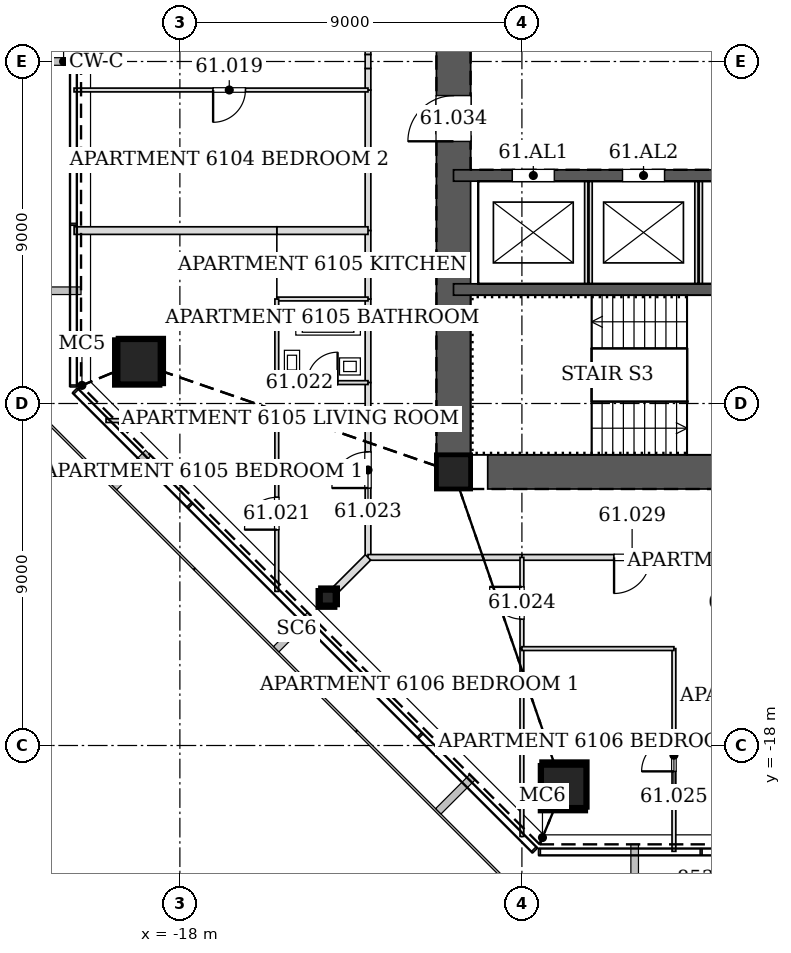
"""IFC4 building model, lengths in metres.
Left out: names, types, materials, properties, quantities, classifications, styles, units other than length and angle.
Written with IfcOpenShell. Run it as: python <this file> out.ifc"""

import sys

from ifc_helpers import new_model, si_unit, direction, frame, frame_2d, origin, origin_2d, place, context, subcontext, project, spatial, rectangle, hollow_rectangle, extrude, element, fill, save


model = new_model("IFC4")
c1 = context("Model", 3, precision=1e-05, world=origin(), true_north=direction((0.0, 1.0)))
c2 = subcontext(c1, "Body", "Model", "MODEL_VIEW")
j1 = project(units=[si_unit("LENGTHUNIT", "METRE"), si_unit("PLANEANGLEUNIT", "RADIAN")], contexts=[c1])
p1 = place(None, origin())
s1 = spatial("IfcSite", under=j1, at=p1, CompositionType="ELEMENT")
p2 = place(p1, origin())
s2 = spatial("IfcBuilding", under=s1, at=p2, CompositionType="ELEMENT")
p3 = place(p2, frame((0.0, 0.0, 255.0)))
s3 = spatial("IfcBuildingStorey", under=s2, at=p3, CompositionType="ELEMENT", Elevation=255.0)
for number, where, z_axis, x_axis in (
    (1, (-19.123, -7.921, 0.0), (0.028, 0.012, 1.0), (-0.383, 0.924, 0.0)),
    (2, (-7.921, -19.123, 0.0), (0.012, 0.028, 1.0), (-0.924, 0.383, 0.0)),
):
    element("IfcColumn", number, at=place(p3, frame(where, z_axis=z_axis, x_axis=x_axis)), inside=s3, PredefinedType="COLUMN", context=c2, shape_type="SweptSolid", body=[
        extrude(hollow_rectangle(XDim=1.2, YDim=1.2, WallThickness=0.055, at=origin_2d()), origin(), (0.0, 0.0, 1.0), 3.401),
    ])
for number, where, z_axis, x_axis in (
    (3, (-20.001, 0.0, 0.0), (0.028, 0.0, 1.0), (0.0, 1.0, 0.0)),
    (4, (-14.143, -14.143, 0.0), (0.02, 0.02, 1.0), (-0.707, 0.707, 0.0)),
):
    element("IfcColumn", number, at=place(p3, frame(where, z_axis=z_axis, x_axis=x_axis)), inside=s3, PredefinedType="COLUMN", context=c2, shape_type="SweptSolid", body=[
        extrude(hollow_rectangle(XDim=0.45, YDim=0.45, WallThickness=0.02, at=origin_2d()), origin(), (0.0, 0.0, 1.0), 3.401),
    ])
p4 = place(p3, frame((-10.8, -10.8, 0.0), z_axis=(0.0, 0.0, 1.0), x_axis=(1.0, 0.0, 0.0)))
e5 = element("IfcColumn", 5, at=p4, inside=s3, PredefinedType="COLUMN", context=c2, shape_type="SweptSolid", body=[
    extrude(hollow_rectangle(XDim=0.9, YDim=0.9, WallThickness=0.04, at=origin_2d()), origin(), (0.0, 0.0, 1.0), 3.4),
])
p5 = place(p3, frame((-10.8, -10.8, 0.0), z_axis=(0.0, 0.0, 1.0), x_axis=(1.0, 0.0, 0.0)))
e6 = element("IfcWall", 6, at=p5, inside=s3, PredefinedType="SOLIDWALL", context=c2, shape_type="SweptSolid", body=[
    extrude(rectangle(XDim=21.6, YDim=0.9, at=frame_2d((10.8, 0.0))), origin(), (0.0, 0.0, 1.0), 3.4),
])
p6 = place(p5, frame((10.05, 0.0, 0.0)))
e7 = element("IfcOpeningElement", 7, at=p6, cuts=e6, PredefinedType="OPENING", context=c2, shape_type="SweptSolid", body=[
    extrude(rectangle(XDim=1.5, YDim=2.1, at=frame_2d((0.75, 1.05))), frame((0.0, 0.46, 0.0), z_axis=(0.0, -1.0, 0.0), x_axis=(1.0, 0.0, 0.0)), (0.0, 0.0, 1.0), 0.92),
])
p7 = place(p5, frame((17.1, 0.0, 0.0)))
e8 = element("IfcOpeningElement", 8, at=p7, cuts=e6, PredefinedType="OPENING", context=c2, shape_type="SweptSolid", body=[
    extrude(rectangle(XDim=0.9, YDim=2.1, at=frame_2d((0.45, 1.05))), frame((0.0, 0.46, 0.0), z_axis=(0.0, -1.0, 0.0), x_axis=(1.0, 0.0, 0.0)), (0.0, 0.0, 1.0), 0.92),
])
p8 = place(p3, frame((-10.8, 10.8, 0.0), z_axis=(0.0, 0.0, 1.0), x_axis=(0.0, -1.0, 0.0)))
e9 = element("IfcWall", 9, at=p8, inside=s3, PredefinedType="SOLIDWALL", context=c2, shape_type="SweptSolid", body=[
    extrude(rectangle(XDim=21.6, YDim=0.9, at=frame_2d((10.8, 0.0))), origin(), (0.0, 0.0, 1.0), 3.4),
])
p9 = place(p8, frame((8.7, 0.0, 0.0)))
e10 = element("IfcOpeningElement", 10, at=p9, cuts=e9, PredefinedType="OPENING", context=c2, shape_type="SweptSolid", body=[
    extrude(rectangle(XDim=1.2, YDim=2.1, at=frame_2d((0.6, 1.05))), frame((0.0, 0.46, 0.0), z_axis=(0.0, -1.0, 0.0), x_axis=(1.0, 0.0, 0.0)), (0.0, 0.0, 1.0), 0.92),
])
p10 = place(p8, frame((11.7, 0.0, 0.0)))
e11 = element("IfcOpeningElement", 11, at=p10, cuts=e9, PredefinedType="OPENING", context=c2, shape_type="SweptSolid", body=[
    extrude(rectangle(XDim=1.2, YDim=2.1, at=frame_2d((0.6, 1.05))), frame((0.0, 0.46, 0.0), z_axis=(0.0, -1.0, 0.0), x_axis=(1.0, 0.0, 0.0)), (0.0, 0.0, 1.0), 0.92),
])
p11 = place(p3, frame((-10.8, -3.0, 0.0), z_axis=(0.0, 0.0, 1.0), x_axis=(1.0, 0.0, 0.0)))
e12 = element("IfcWall", 12, at=p11, inside=s3, PredefinedType="SOLIDWALL", context=c2, shape_type="SweptSolid", body=[
    extrude(rectangle(XDim=21.6, YDim=0.3, at=frame_2d((10.8, 0.0))), origin(), (0.0, 0.0, 1.0), 3.4),
])
p12 = place(p11, frame((13.25, 0.0, 0.0)))
e13 = element("IfcOpeningElement", 13, at=p12, cuts=e12, PredefinedType="OPENING", context=c2, shape_type="SweptSolid", body=[
    extrude(rectangle(XDim=0.9, YDim=2.1, at=frame_2d((0.45, 1.05))), frame((0.0, 0.16, 0.0), z_axis=(0.0, -1.0, 0.0), x_axis=(1.0, 0.0, 0.0)), (0.0, 0.0, 1.0), 0.32),
])
p13 = place(p11, frame((1.55, 0.0, 0.0)))
e14 = element("IfcOpeningElement", 14, at=p13, cuts=e12, PredefinedType="OPENING", context=c2, shape_type="SweptSolid", body=[
    extrude(rectangle(XDim=1.1, YDim=2.1, at=frame_2d((0.55, 1.05))), frame((0.0, 0.16, 0.0), z_axis=(0.0, -1.0, 0.0), x_axis=(1.0, 0.0, 0.0)), (0.0, 0.0, 1.0), 0.32),
])
p14 = place(p11, frame((4.45, 0.0, 0.0)))
e15 = element("IfcOpeningElement", 15, at=p14, cuts=e12, PredefinedType="OPENING", context=c2, shape_type="SweptSolid", body=[
    extrude(rectangle(XDim=1.1, YDim=2.1, at=frame_2d((0.55, 1.05))), frame((0.0, 0.16, 0.0), z_axis=(0.0, -1.0, 0.0), x_axis=(1.0, 0.0, 0.0)), (0.0, 0.0, 1.0), 0.32),
])
p15 = place(p11, frame((7.35, 0.0, 0.0)))
e16 = element("IfcOpeningElement", 16, at=p15, cuts=e12, PredefinedType="OPENING", context=c2, shape_type="SweptSolid", body=[
    extrude(rectangle(XDim=1.1, YDim=2.1, at=frame_2d((0.55, 1.05))), frame((0.0, 0.16, 0.0), z_axis=(0.0, -1.0, 0.0), x_axis=(1.0, 0.0, 0.0)), (0.0, 0.0, 1.0), 0.32),
])
p16 = place(p3, frame((-10.8, -6.0, 0.0), z_axis=(0.0, 0.0, 1.0), x_axis=(1.0, 0.0, 0.0)))
e17 = element("IfcWall", 17, at=p16, inside=s3, PredefinedType="SOLIDWALL", context=c2, shape_type="SweptSolid", body=[
    extrude(rectangle(XDim=21.6, YDim=0.3, at=frame_2d((10.8, 0.0))), origin(), (0.0, 0.0, 1.0), 3.4),
])
p17 = place(p16, frame((10.25, 0.0, 0.0)))
e18 = element("IfcOpeningElement", 18, at=p17, cuts=e17, PredefinedType="OPENING", context=c2, shape_type="SweptSolid", body=[
    extrude(rectangle(XDim=1.1, YDim=2.1, at=frame_2d((0.55, 1.05))), frame((0.0, 0.16, 0.0), z_axis=(0.0, -1.0, 0.0), x_axis=(1.0, 0.0, 0.0)), (0.0, 0.0, 1.0), 0.32),
])
p18 = place(p3, frame((-13.05, -0.749, 0.0), z_axis=(0.0, 0.0, 1.0), x_axis=(0.0, -1.0, 0.0)))
e19 = element("IfcWall", 19, at=p18, inside=s3, PredefinedType="PARTITIONING", context=c2, shape_type="SweptSolid", body=[
    extrude(rectangle(XDim=3.702, YDim=0.15, at=frame_2d((1.851, 0.0))), origin(), (0.0, 0.0, 1.0), 2.662),
])
p19 = place(p3, frame((-13.05, 3.651, 0.0), z_axis=(0.0, 0.0, 1.0), x_axis=(0.0, -1.0, 0.0)))
e20 = element("IfcWall", 20, at=p19, inside=s3, PredefinedType="PARTITIONING", context=c2, shape_type="SweptSolid", body=[
    extrude(rectangle(XDim=3.469, YDim=0.15, at=frame_2d((1.734, 0.0))), origin(), (0.0, 0.0, 1.0), 2.662),
])
p20 = place(p19, frame((1.259, 0.0, 0.0)))
e21 = element("IfcOpeningElement", 21, at=p20, cuts=e20, PredefinedType="OPENING", context=c2, shape_type="SweptSolid", body=[
    extrude(rectangle(XDim=0.95, YDim=2.1, at=frame_2d((0.475, 1.05))), frame((0.0, 0.085, 0.0), z_axis=(0.0, -1.0, 0.0), x_axis=(1.0, 0.0, 0.0)), (0.0, 0.0, 1.0), 0.17),
])
p21 = place(p3, frame((-13.05, -0.182, 0.0), z_axis=(0.0, 0.0, 1.0), x_axis=(0.0, -1.0, 0.0)))
e22 = element("IfcWall", 22, at=p21, inside=s3, PredefinedType="PARTITIONING", context=c2, shape_type="SweptSolid", body=[
    extrude(rectangle(XDim=0.569, YDim=0.15, at=frame_2d((0.284, 0.0))), origin(), (0.0, 0.0, 1.0), 2.662),
])
p22 = place(p3, frame((-13.05, 0.182, 0.0), z_axis=(0.0, 0.0, 1.0), x_axis=(0.0, -1.0, 0.0)))
e23 = element("IfcWall", 23, at=p22, inside=s3, PredefinedType="PARTITIONING", context=c2, shape_type="SweptSolid", body=[
    extrude(rectangle(XDim=0.365, YDim=0.15, at=frame_2d((0.182, 0.0))), origin(), (0.0, 0.0, 1.0), 2.268),
])
p23 = place(p3, frame((-13.05, -6.249, 0.0), z_axis=(0.0, 0.0, 1.0), x_axis=(0.0, -1.0, 0.0)))
e24 = element("IfcWall", 24, at=p23, inside=s3, PredefinedType="PARTITIONING", context=c2, shape_type="SweptSolid", body=[
    extrude(rectangle(XDim=2.202, YDim=0.15, at=frame_2d((1.101, 0.0))), origin(), (0.0, 0.0, 1.0), 2.662),
])
p24 = place(p3, frame((-13.05, -4.449, 0.0), z_axis=(0.0, 0.0, 1.0), x_axis=(0.0, -1.0, 0.0)))
e25 = element("IfcWall", 25, at=p24, inside=s3, PredefinedType="PARTITIONING", context=c2, shape_type="SweptSolid", body=[
    extrude(rectangle(XDim=1.802, YDim=0.15, at=frame_2d((0.901, 0.0))), origin(), (0.0, 0.0, 1.0), 2.662),
])
p25 = place(p3, frame((-13.05, -8.449, 0.0), z_axis=(0.0, 0.0, 1.0), x_axis=(0.0, -1.0, 0.0)))
e26 = element("IfcWall", 26, at=p25, inside=s3, PredefinedType="PARTITIONING", context=c2, shape_type="SweptSolid", body=[
    extrude(rectangle(XDim=4.601, YDim=0.15, at=frame_2d((2.301, 0.0))), origin(), (0.0, 0.0, 1.0), 2.349),
])
p26 = place(p25, frame((1.825, 0.0, 0.0)))
e27 = element("IfcOpeningElement", 27, at=p26, cuts=e26, PredefinedType="OPENING", context=c2, shape_type="SweptSolid", body=[
    extrude(rectangle(XDim=0.95, YDim=2.1, at=frame_2d((0.475, 1.05))), frame((0.0, 0.085, 0.0), z_axis=(0.0, -1.0, 0.0), x_axis=(1.0, 0.0, 0.0)), (0.0, 0.0, 1.0), 0.17),
])
p27 = place(p3, frame((-13.05, -13.05, 0.0), z_axis=(0.0, 0.0, 1.0), x_axis=(1.0, 0.0, 0.0)))
e28 = element("IfcWall", 28, at=p27, inside=s3, PredefinedType="PARTITIONING", context=c2, shape_type="SweptSolid", body=[
    extrude(rectangle(XDim=4.051, YDim=0.15, at=frame_2d((2.025, 0.0))), origin(), (0.0, 0.0, 1.0), 2.349),
])
p28 = place(p3, frame((-9.001, -13.05, 0.0), z_axis=(0.0, 0.0, 1.0), x_axis=(1.0, 0.0, 0.0)))
e29 = element("IfcWall", 29, at=p28, inside=s3, PredefinedType="PARTITIONING", context=c2, shape_type="SweptSolid", body=[
    extrude(rectangle(XDim=5.802, YDim=0.15, at=frame_2d((2.901, 0.0))), origin(), (0.0, 0.0, 1.0), 2.662),
])
p29 = place(p28, frame((2.426, 0.0, 0.0)))
e30 = element("IfcOpeningElement", 30, at=p29, cuts=e29, PredefinedType="OPENING", context=c2, shape_type="SweptSolid", body=[
    extrude(rectangle(XDim=0.95, YDim=2.1, at=frame_2d((0.475, 1.05))), frame((0.0, 0.085, 0.0), z_axis=(0.0, -1.0, 0.0), x_axis=(1.0, 0.0, 0.0)), (0.0, 0.0, 1.0), 0.17),
])
p30 = place(p3, frame((-13.05, -0.75, 0.0), z_axis=(0.0, 0.0, 1.0), x_axis=(-1.0, 0.0, 0.0)))
e31 = element("IfcWall", 31, at=p30, inside=s3, PredefinedType="PARTITIONING", context=c2, shape_type="SweptSolid", body=[
    extrude(rectangle(XDim=7.735, YDim=0.1, at=frame_2d((3.868, 0.0))), origin(), (0.0, 0.0, 1.0), 2.662),
])
p31 = place(p30, frame((3.226, 0.0, 0.0)))
e32 = element("IfcOpeningElement", 32, at=p31, cuts=e31, PredefinedType="OPENING", context=c2, shape_type="SweptSolid", body=[
    extrude(rectangle(XDim=0.85, YDim=2.1, at=frame_2d((0.425, 1.05))), frame((0.0, 0.06, 0.0), z_axis=(0.0, -1.0, 0.0), x_axis=(1.0, 0.0, 0.0)), (0.0, 0.0, 1.0), 0.12),
])
p32 = place(p3, frame((-15.451, -4.45, 0.0), z_axis=(0.0, 0.0, 1.0), x_axis=(1.0, 0.0, 0.0)))
e33 = element("IfcWall", 33, at=p32, inside=s3, PredefinedType="PARTITIONING", context=c2, shape_type="SweptSolid", body=[
    extrude(rectangle(XDim=2.401, YDim=0.2, at=frame_2d((1.2, 0.0))), origin(), (0.0, 0.0, 1.0), 2.662),
])
p33 = place(p3, frame((-20.783, -4.45, 0.0), z_axis=(0.0, 0.0, 1.0), x_axis=(1.0, 0.0, 0.0)))
e34 = element("IfcWall", 34, at=p33, inside=s3, PredefinedType="PARTITIONING", context=c2, shape_type="SweptSolid", body=[
    extrude(rectangle(XDim=5.334, YDim=0.2, at=frame_2d((2.667, 0.0))), origin(), (0.0, 0.0, 1.0), 2.662),
])
p34 = place(p3, frame((-15.45, -13.945, 0.0), z_axis=(0.0, 0.0, 1.0), x_axis=(0.0, 1.0, 0.0)))
e35 = element("IfcWall", 35, at=p34, inside=s3, PredefinedType="PARTITIONING", context=c2, shape_type="SweptSolid", body=[
    extrude(rectangle(XDim=4.495, YDim=0.1, at=frame_2d((2.248, 0.0))), origin(), (0.0, 0.0, 1.0), 2.74),
])
p35 = place(p34, frame((1.626, 0.0, 0.0)))
e36 = element("IfcOpeningElement", 36, at=p35, cuts=e35, PredefinedType="OPENING", context=c2, shape_type="SweptSolid", body=[
    extrude(rectangle(XDim=0.85, YDim=2.1, at=frame_2d((0.425, 1.05))), frame((0.0, 0.06, 0.0), z_axis=(0.0, -1.0, 0.0), x_axis=(1.0, 0.0, 0.0)), (0.0, 0.0, 1.0), 0.12),
])
p36 = place(p3, frame((-15.45, -9.45, 0.0), z_axis=(0.0, 0.0, 1.0), x_axis=(-1.0, 0.0, 0.0)))
e37 = element("IfcWall", 37, at=p36, inside=s3, PredefinedType="PARTITIONING", context=c2, shape_type="SweptSolid", body=[
    extrude(rectangle(XDim=4.493, YDim=0.1, at=frame_2d((2.247, 0.0))), origin(), (0.0, 0.0, 1.0), 2.74),
])
p37 = place(p3, frame((-13.05, -6.25, 0.0), z_axis=(0.0, 0.0, 1.0), x_axis=(-1.0, 0.0, 0.0)))
e38 = element("IfcWall", 38, at=p37, inside=s3, PredefinedType="PARTITIONING", context=c2, shape_type="SweptSolid", body=[
    extrude(rectangle(XDim=2.4, YDim=0.1, at=frame_2d((1.2, 0.0))), origin(), (0.0, 0.0, 1.0), 2.662),
])
p38 = place(p3, frame((-15.45, -6.25, 0.0), z_axis=(0.0, 0.0, 1.0), x_axis=(0.0, -1.0, 0.0)))
e39 = element("IfcWall", 39, at=p38, inside=s3, PredefinedType="PARTITIONING", context=c2, shape_type="SweptSolid", body=[
    extrude(rectangle(XDim=2.2, YDim=0.1, at=frame_2d((1.1, 0.0))), origin(), (0.0, 0.0, 1.0), 2.74),
])
p39 = place(p3, frame((-15.45, -8.45, 0.0), z_axis=(0.0, 0.0, 1.0), x_axis=(1.0, 0.0, 0.0)))
e40 = element("IfcWall", 40, at=p39, inside=s3, PredefinedType="PARTITIONING", context=c2, shape_type="SweptSolid", body=[
    extrude(rectangle(XDim=2.4, YDim=0.1, at=frame_2d((1.2, 0.0))), origin(), (0.0, 0.0, 1.0), 2.662),
])
p40 = place(p39, frame((0.8, 0.0, 0.0)))
e41 = element("IfcOpeningElement", 41, at=p40, cuts=e40, PredefinedType="OPENING", context=c2, shape_type="SweptSolid", body=[
    extrude(rectangle(XDim=0.8, YDim=2.1, at=frame_2d((0.4, 1.05))), frame((0.0, 0.06, 0.0), z_axis=(0.0, -1.0, 0.0), x_axis=(1.0, 0.0, 0.0)), (0.0, 0.0, 1.0), 0.12),
])
p41 = place(p3, frame((-13.902, -13.902, 0.0), z_axis=(0.0, 0.0, 1.0), x_axis=(0.707106781187, 0.707106781187, 0.0)))
e42 = element("IfcWall", 42, at=p41, inside=s3, PredefinedType="PARTITIONING", context=c2, shape_type="SweptSolid", body=[
    extrude(rectangle(XDim=1.205, YDim=0.2, at=frame_2d((0.603, 0.0))), origin(), (0.0, 0.0, 1.0), 2.656),
])
p42 = place(p3, frame((-9.0, -20.393, 0.0), z_axis=(0.0, 0.0, 1.0), x_axis=(0.0, 1.0, 0.0)))
e43 = element("IfcWall", 43, at=p42, inside=s3, PredefinedType="PARTITIONING", context=c2, shape_type="SweptSolid", body=[
    extrude(rectangle(XDim=4.944, YDim=0.1, at=frame_2d((2.472, 0.0))), origin(), (0.0, 0.0, 1.0), 2.349),
])
p43 = place(p3, frame((-9.0, -15.451, 0.0), z_axis=(0.0, 0.0, 1.0), x_axis=(0.0, 1.0, 0.0)))
e44 = element("IfcWall", 44, at=p43, inside=s3, PredefinedType="PARTITIONING", context=c2, shape_type="SweptSolid", body=[
    extrude(rectangle(XDim=2.401, YDim=0.1, at=frame_2d((1.2, 0.0))), origin(), (0.0, 0.0, 1.0), 2.349),
])
p44 = place(p43, frame((0.775, 0.0, 0.0)))
e45 = element("IfcOpeningElement", 45, at=p44, cuts=e44, PredefinedType="OPENING", context=c2, shape_type="SweptSolid", body=[
    extrude(rectangle(XDim=0.85, YDim=2.1, at=frame_2d((0.425, 1.05))), frame((0.0, 0.06, 0.0), z_axis=(0.0, -1.0, 0.0), x_axis=(1.0, 0.0, 0.0)), (0.0, 0.0, 1.0), 0.12),
])
p45 = place(p3, frame((-5.0, -20.785, 0.0), z_axis=(0.0, 0.0, 1.0), x_axis=(0.0, 1.0, 0.0)))
e46 = element("IfcWall", 46, at=p45, inside=s3, PredefinedType="PARTITIONING", context=c2, shape_type="SweptSolid", body=[
    extrude(rectangle(XDim=5.335, YDim=0.1, at=frame_2d((2.667, 0.0))), origin(), (0.0, 0.0, 1.0), 2.662),
])
p46 = place(p45, frame((2.104, 0.0, 0.0)))
e47 = element("IfcOpeningElement", 47, at=p46, cuts=e46, PredefinedType="OPENING", context=c2, shape_type="SweptSolid", body=[
    extrude(rectangle(XDim=0.85, YDim=2.1, at=frame_2d((0.425, 1.05))), frame((0.0, 0.06, 0.0), z_axis=(0.0, -1.0, 0.0), x_axis=(1.0, 0.0, 0.0)), (0.0, 0.0, 1.0), 0.12),
])
p47 = place(p3, frame((-5.0, -15.45, 0.0), z_axis=(0.0, 0.0, 1.0), x_axis=(-1.0, 0.0, 0.0)))
e48 = element("IfcWall", 48, at=p47, inside=s3, PredefinedType="PARTITIONING", context=c2, shape_type="SweptSolid", body=[
    extrude(rectangle(XDim=4.0, YDim=0.1, at=frame_2d((2.0, 0.0))), origin(), (0.0, 0.0, 1.0), 2.349),
])
for number, where, z_axis, x_axis in (
    (49, (-7.25, -5.85, 0.0), (0.0, 0.0, 1.0), (0.0, 1.0, 0.0)),
    (50, (-4.35, -5.85, 0.0), (0.0, 0.0, 1.0), (0.0, 1.0, 0.0)),
):
    element("IfcWall", number, at=place(p3, frame(where, z_axis=z_axis, x_axis=x_axis)), inside=s3, PredefinedType="PARTITIONING", context=c2, shape_type="SweptSolid", body=[
        extrude(rectangle(XDim=2.7, YDim=0.2, at=frame_2d((1.35, 0.0))), origin(), (0.0, 0.0, 1.0), 3.4),
    ])
p48 = place(p31, origin())
e51 = element("IfcDoor", 51, at=p48, inside=s3, OperationType="SINGLE_SWING_RIGHT", PredefinedType="DOOR", context=c2, shape_type="SweptSolid", body=[
    extrude(rectangle(XDim=0.85, YDim=2.1, at=frame_2d((0.425, 1.05))), frame((0.0, 0.025, 0.0), z_axis=(0.0, -1.0, 0.0), x_axis=(1.0, 0.0, 0.0)), (0.0, 0.0, 1.0), 0.05),
])
fill(e32, e51)
p49 = place(p35, origin())
e52 = element("IfcDoor", 52, at=p49, inside=s3, OperationType="SINGLE_SWING_LEFT", PredefinedType="DOOR", context=c2, shape_type="SweptSolid", body=[
    extrude(rectangle(XDim=0.85, YDim=2.1, at=frame_2d((0.425, 1.05))), frame((0.0, 0.025, 0.0), z_axis=(0.0, -1.0, 0.0), x_axis=(1.0, 0.0, 0.0)), (0.0, 0.0, 1.0), 0.05),
])
fill(e36, e52)
p50 = place(p40, origin())
e53 = element("IfcDoor", 53, at=p50, inside=s3, OperationType="SINGLE_SWING_RIGHT", PredefinedType="DOOR", context=c2, shape_type="SweptSolid", body=[
    extrude(rectangle(XDim=0.8, YDim=2.1, at=frame_2d((0.4, 1.05))), frame((0.0, 0.025, 0.0), z_axis=(0.0, -1.0, 0.0), x_axis=(1.0, 0.0, 0.0)), (0.0, 0.0, 1.0), 0.05),
])
fill(e41, e53)
p51 = place(p26, frame((0.95, 0.0, 0.0), z_axis=(0.0, 0.0, 1.0), x_axis=(-1.0, 0.0, 0.0)))
e54 = element("IfcDoor", 54, at=p51, inside=s3, OperationType="SINGLE_SWING_LEFT", PredefinedType="DOOR", context=c2, shape_type="SweptSolid", body=[
    extrude(rectangle(XDim=0.95, YDim=2.1, at=frame_2d((0.475, 1.05))), frame((0.0, 0.025, 0.0), z_axis=(0.0, -1.0, 0.0), x_axis=(1.0, 0.0, 0.0)), (0.0, 0.0, 1.0), 0.05),
])
fill(e27, e54)
p52 = place(p44, origin())
e55 = element("IfcDoor", 55, at=p52, inside=s3, OperationType="SINGLE_SWING_RIGHT", PredefinedType="DOOR", context=c2, shape_type="SweptSolid", body=[
    extrude(rectangle(XDim=0.85, YDim=2.1, at=frame_2d((0.425, 1.05))), frame((0.0, 0.025, 0.0), z_axis=(0.0, -1.0, 0.0), x_axis=(1.0, 0.0, 0.0)), (0.0, 0.0, 1.0), 0.05),
])
fill(e45, e55)
p53 = place(p46, origin())
e56 = element("IfcDoor", 56, at=p53, inside=s3, OperationType="SINGLE_SWING_LEFT", PredefinedType="DOOR", context=c2, shape_type="SweptSolid", body=[
    extrude(rectangle(XDim=0.85, YDim=2.1, at=frame_2d((0.425, 1.05))), frame((0.0, 0.025, 0.0), z_axis=(0.0, -1.0, 0.0), x_axis=(1.0, 0.0, 0.0)), (0.0, 0.0, 1.0), 0.05),
])
fill(e47, e56)
p54 = place(p29, frame((0.95, 0.0, 0.0), z_axis=(0.0, 0.0, 1.0), x_axis=(-1.0, 0.0, 0.0)))
e57 = element("IfcDoor", 57, at=p54, inside=s3, OperationType="SINGLE_SWING_RIGHT", PredefinedType="DOOR", context=c2, shape_type="SweptSolid", body=[
    extrude(rectangle(XDim=0.95, YDim=2.1, at=frame_2d((0.475, 1.05))), frame((0.0, 0.025, 0.0), z_axis=(0.0, -1.0, 0.0), x_axis=(1.0, 0.0, 0.0)), (0.0, 0.0, 1.0), 0.05),
])
fill(e30, e57)
p55 = place(p10, frame((1.2, 0.0, 0.0), z_axis=(0.0, 0.0, 1.0), x_axis=(-1.0, 0.0, 0.0)))
e58 = element("IfcDoor", 58, at=p55, inside=s3, OperationType="SINGLE_SWING_LEFT", PredefinedType="DOOR", context=c2, shape_type="SweptSolid", body=[
    extrude(rectangle(XDim=1.2, YDim=2.1, at=frame_2d((0.6, 1.05))), frame((0.0, 0.025, 0.0), z_axis=(0.0, -1.0, 0.0), x_axis=(1.0, 0.0, 0.0)), (0.0, 0.0, 1.0), 0.05),
])
fill(e11, e58)
p56 = place(p13, origin())
e59 = element("IfcDoor", 59, at=p56, inside=s3, OperationType="DOUBLE_DOOR_SLIDING", PredefinedType="DOOR", context=c2, shape_type="SweptSolid", body=[
    extrude(rectangle(XDim=1.1, YDim=2.1, at=frame_2d((0.55, 1.05))), frame((0.0, 0.025, 0.0), z_axis=(0.0, -1.0, 0.0), x_axis=(1.0, 0.0, 0.0)), (0.0, 0.0, 1.0), 0.05),
])
fill(e14, e59)
p57 = place(p14, origin())
e60 = element("IfcDoor", 60, at=p57, inside=s3, OperationType="DOUBLE_DOOR_SLIDING", PredefinedType="DOOR", context=c2, shape_type="SweptSolid", body=[
    extrude(rectangle(XDim=1.1, YDim=2.1, at=frame_2d((0.55, 1.05))), frame((0.0, 0.025, 0.0), z_axis=(0.0, -1.0, 0.0), x_axis=(1.0, 0.0, 0.0)), (0.0, 0.0, 1.0), 0.05),
])
fill(e15, e60)
save(model, sys.argv[1])
